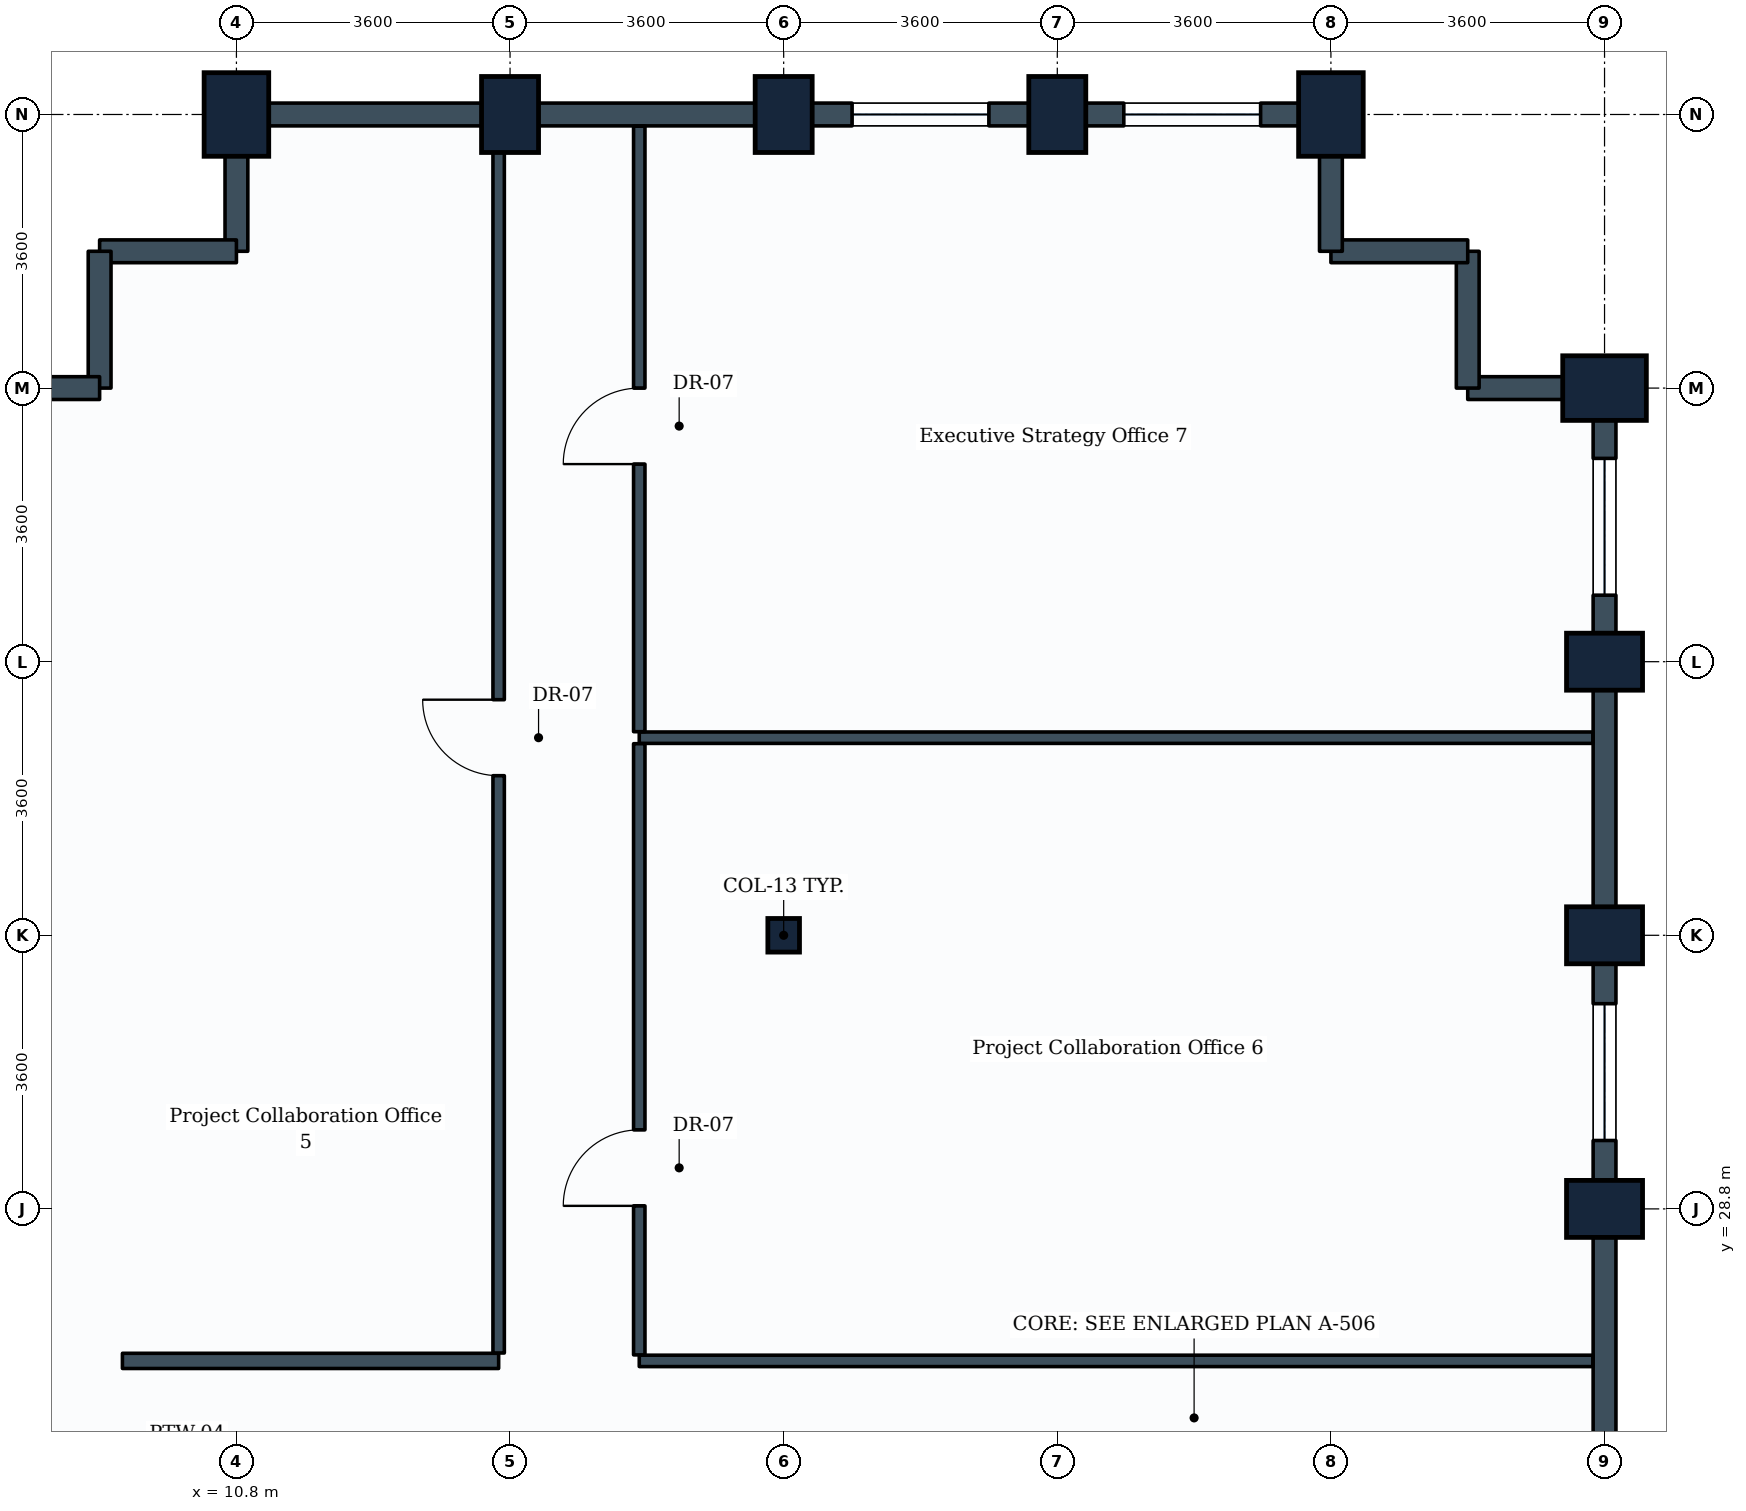
"""IFC4 building model, lengths in metres.
Left out: names, types, materials, properties, quantities, classifications, styles, units other than length and angle.
Written with IfcOpenShell. Run it as: python <this file> out.ifc"""

import sys

from ifc_helpers import new_model, si_unit, direction, frame, frame_2d, origin, origin_2d, place, context, subcontext, project, spatial, rectangle, i_section, extrude, element, fill, save


model = new_model("IFC4")
c1 = context("Model", 3, precision=1e-05, world=origin(), true_north=direction((0.0, 1.0)))
c2 = subcontext(c1, "Body", "Model", "MODEL_VIEW")
j1 = project(units=[si_unit("LENGTHUNIT", "METRE"), si_unit("PLANEANGLEUNIT", "RADIAN")], contexts=[c1])
p1 = place(None, origin())
s1 = spatial("IfcSite", under=j1, at=p1, CompositionType="ELEMENT")
p2 = place(p1, origin())
s2 = spatial("IfcBuilding", under=s1, at=p2, CompositionType="ELEMENT")
p3 = place(p2, frame((0.0, 0.0, 158.0)))
s3 = spatial("IfcBuildingStorey", under=s2, at=p3, CompositionType="ELEMENT", Elevation=158.0)
p4 = place(p3, frame((10.8, 43.2, 0.0), z_axis=(0.0, 0.0, 1.0), x_axis=(1.0, 0.0, 0.0)))
e1 = element("IfcColumn", 1, at=p4, inside=s3, PredefinedType="COLUMN", context=c2, shape_type="SweptSolid", body=[
    extrude(rectangle(XDim=0.85, YDim=1.1, at=origin_2d()), origin(), (0.0, 0.0, 1.0), 3.8),
])
p5 = place(p3, frame((14.4, 43.2, 0.0), z_axis=(0.0, 0.0, 1.0), x_axis=(1.0, 0.0, 0.0)))
e2 = element("IfcColumn", 2, at=p5, inside=s3, PredefinedType="COLUMN", context=c2, shape_type="SweptSolid", body=[
    extrude(rectangle(XDim=0.75, YDim=1.0, at=origin_2d()), origin(), (0.0, 0.0, 1.0), 3.8),
])
p6 = place(p3, frame((18.0, 32.4, 0.0), z_axis=(0.0, 0.0, 1.0), x_axis=(1.0, 0.0, 0.0)))
e3 = element("IfcColumn", 3, at=p6, inside=s3, PredefinedType="COLUMN", context=c2, shape_type="SweptSolid", body=[
    extrude(i_section(OverallWidth=0.416, OverallDepth=0.442, WebThickness=0.025, FlangeThickness=0.041, FilletRadius=0.015, at=origin_2d()), origin(), (0.0, 0.0, 1.0), 3.8),
])
for number, where, z_axis, x_axis in (
    (4, (18.0, 43.2, 0.0), (0.0, 0.0, 1.0), (1.0, 0.0, 0.0)),
    (5, (21.6, 43.2, 0.0), (0.0, 0.0, 1.0), (1.0, 0.0, 0.0)),
):
    element("IfcColumn", number, at=place(p3, frame(where, z_axis=z_axis, x_axis=x_axis)), inside=s3, PredefinedType="COLUMN", context=c2, shape_type="SweptSolid", body=[
        extrude(rectangle(XDim=0.75, YDim=1.0, at=origin_2d()), origin(), (0.0, 0.0, 1.0), 3.8),
    ])
p7 = place(p3, frame((25.2, 43.2, 0.0), z_axis=(0.0, 0.0, 1.0), x_axis=(1.0, 0.0, 0.0)))
e6 = element("IfcColumn", 6, at=p7, inside=s3, PredefinedType="COLUMN", context=c2, shape_type="SweptSolid", body=[
    extrude(rectangle(XDim=0.85, YDim=1.1, at=origin_2d()), origin(), (0.0, 0.0, 1.0), 3.8),
])
for number, where, z_axis, x_axis in (
    (7, (28.8, 28.8, 0.0), (0.0, 0.0, 1.0), (0.0, 1.0, 0.0)),
    (8, (28.8, 32.4, 0.0), (0.0, 0.0, 1.0), (0.0, 1.0, 0.0)),
    (9, (28.8, 36.0, 0.0), (0.0, 0.0, 1.0), (0.0, 1.0, 0.0)),
):
    element("IfcColumn", number, at=place(p3, frame(where, z_axis=z_axis, x_axis=x_axis)), inside=s3, PredefinedType="COLUMN", context=c2, shape_type="SweptSolid", body=[
        extrude(rectangle(XDim=0.75, YDim=1.0, at=origin_2d()), origin(), (0.0, 0.0, 1.0), 3.8),
    ])
p8 = place(p3, frame((28.8, 39.6, 0.0), z_axis=(0.0, 0.0, 1.0), x_axis=(0.0, 1.0, 0.0)))
e10 = element("IfcColumn", 10, at=p8, inside=s3, PredefinedType="COLUMN", context=c2, shape_type="SweptSolid", body=[
    extrude(rectangle(XDim=0.85, YDim=1.1, at=origin_2d()), origin(), (0.0, 0.0, 1.0), 3.8),
])
p9 = place(p3, frame((28.8, 28.8, 0.0), z_axis=(0.0, 0.0, 1.0), x_axis=(0.0, -1.0, 0.0)))
e11 = element("IfcWall", 11, at=p9, inside=s3, PredefinedType="STANDARD", context=c2, shape_type="SweptSolid", body=[
    extrude(rectangle(XDim=3.6, YDim=0.3, at=frame_2d((1.8, 0.0))), origin(), (0.0, 0.0, 1.0), 3.17),
])
p10 = place(p3, frame((28.8, 32.4, 0.0), z_axis=(0.0, 0.0, 1.0), x_axis=(0.0, -1.0, 0.0)))
e12 = element("IfcWall", 12, at=p10, inside=s3, PredefinedType="STANDARD", context=c2, shape_type="SweptSolid", body=[
    extrude(rectangle(XDim=3.6, YDim=0.3, at=frame_2d((1.8, 0.0))), origin(), (0.0, 0.0, 1.0), 2.93),
])
p11 = place(p10, frame((0.9, 0.0, 0.85)))
e13 = element("IfcOpeningElement", 13, at=p11, cuts=e12, PredefinedType="OPENING", context=c2, shape_type="SweptSolid", body=[
    extrude(rectangle(XDim=1.8, YDim=1.35, at=frame_2d((0.9, 0.675))), frame((0.0, 0.16, 0.0), z_axis=(0.0, -1.0, 0.0), x_axis=(1.0, 0.0, 0.0)), (0.0, 0.0, 1.0), 0.32),
])
p12 = place(p3, frame((28.8, 36.0, 0.0), z_axis=(0.0, 0.0, 1.0), x_axis=(0.0, -1.0, 0.0)))
e14 = element("IfcWall", 14, at=p12, inside=s3, PredefinedType="STANDARD", context=c2, shape_type="SweptSolid", body=[
    extrude(rectangle(XDim=3.6, YDim=0.3, at=frame_2d((1.8, 0.0))), origin(), (0.0, 0.0, 1.0), 2.93),
])
p13 = place(p3, frame((28.8, 39.6, 0.0), z_axis=(0.0, 0.0, 1.0), x_axis=(0.0, -1.0, 0.0)))
e15 = element("IfcWall", 15, at=p13, inside=s3, PredefinedType="STANDARD", context=c2, shape_type="SweptSolid", body=[
    extrude(rectangle(XDim=3.6, YDim=0.3, at=frame_2d((1.8, 0.0))), origin(), (0.0, 0.0, 1.0), 2.93),
])
p14 = place(p13, frame((0.925, 0.0, 0.85)))
e16 = element("IfcOpeningElement", 16, at=p14, cuts=e15, PredefinedType="OPENING", context=c2, shape_type="SweptSolid", body=[
    extrude(rectangle(XDim=1.8, YDim=1.35, at=frame_2d((0.9, 0.675))), frame((0.0, 0.16, 0.0), z_axis=(0.0, -1.0, 0.0), x_axis=(1.0, 0.0, 0.0)), (0.0, 0.0, 1.0), 0.32),
])
p15 = place(p3, frame((27.0, 39.6, 0.0), z_axis=(0.0, 0.0, 1.0), x_axis=(1.0, 0.0, 0.0)))
e17 = element("IfcWall", 17, at=p15, inside=s3, PredefinedType="STANDARD", context=c2, shape_type="SweptSolid", body=[
    extrude(rectangle(XDim=1.8, YDim=0.3, at=frame_2d((0.9, 0.0))), origin(), (0.0, 0.0, 1.0), 2.93),
])
p16 = place(p3, frame((27.0, 39.6, 0.0), z_axis=(0.0, 0.0, 1.0), x_axis=(0.0, 1.0, 0.0)))
e18 = element("IfcWall", 18, at=p16, inside=s3, PredefinedType="STANDARD", context=c2, shape_type="SweptSolid", body=[
    extrude(rectangle(XDim=1.8, YDim=0.3, at=frame_2d((0.9, 0.0))), origin(), (0.0, 0.0, 1.0), 3.535),
])
p17 = place(p3, frame((25.2, 41.4, 0.0), z_axis=(0.0, 0.0, 1.0), x_axis=(1.0, 0.0, 0.0)))
e19 = element("IfcWall", 19, at=p17, inside=s3, PredefinedType="STANDARD", context=c2, shape_type="SweptSolid", body=[
    extrude(rectangle(XDim=1.8, YDim=0.3, at=frame_2d((0.9, 0.0))), origin(), (0.0, 0.0, 1.0), 3.535),
])
p18 = place(p3, frame((25.2, 41.4, 0.0), z_axis=(0.0, 0.0, 1.0), x_axis=(0.0, 1.0, 0.0)))
e20 = element("IfcWall", 20, at=p18, inside=s3, PredefinedType="STANDARD", context=c2, shape_type="SweptSolid", body=[
    extrude(rectangle(XDim=1.8, YDim=0.3, at=frame_2d((0.9, 0.0))), origin(), (0.0, 0.0, 1.0), 2.93),
])
p19 = place(p3, frame((21.6, 43.2, 0.0), z_axis=(0.0, 0.0, 1.0), x_axis=(1.0, 0.0, 0.0)))
e21 = element("IfcWall", 21, at=p19, inside=s3, PredefinedType="STANDARD", context=c2, shape_type="SweptSolid", body=[
    extrude(rectangle(XDim=3.6, YDim=0.3, at=frame_2d((1.8, 0.0))), origin(), (0.0, 0.0, 1.0), 2.93),
])
p20 = place(p19, frame((0.875, 0.0, 0.85)))
e22 = element("IfcOpeningElement", 22, at=p20, cuts=e21, PredefinedType="OPENING", context=c2, shape_type="SweptSolid", body=[
    extrude(rectangle(XDim=1.8, YDim=1.35, at=frame_2d((0.9, 0.675))), frame((0.0, 0.16, 0.0), z_axis=(0.0, -1.0, 0.0), x_axis=(1.0, 0.0, 0.0)), (0.0, 0.0, 1.0), 0.32),
])
p21 = place(p3, frame((18.0, 43.2, 0.0), z_axis=(0.0, 0.0, 1.0), x_axis=(1.0, 0.0, 0.0)))
e23 = element("IfcWall", 23, at=p21, inside=s3, PredefinedType="STANDARD", context=c2, shape_type="SweptSolid", body=[
    extrude(rectangle(XDim=3.6, YDim=0.3, at=frame_2d((1.8, 0.0))), origin(), (0.0, 0.0, 1.0), 2.93),
])
p22 = place(p21, frame((0.9, 0.0, 0.85)))
e24 = element("IfcOpeningElement", 24, at=p22, cuts=e23, PredefinedType="OPENING", context=c2, shape_type="SweptSolid", body=[
    extrude(rectangle(XDim=1.8, YDim=1.35, at=frame_2d((0.9, 0.675))), frame((0.0, 0.16, 0.0), z_axis=(0.0, -1.0, 0.0), x_axis=(1.0, 0.0, 0.0)), (0.0, 0.0, 1.0), 0.32),
])
p23 = place(p3, frame((14.4, 43.2, 0.0), z_axis=(0.0, 0.0, 1.0), x_axis=(1.0, 0.0, 0.0)))
e25 = element("IfcWall", 25, at=p23, inside=s3, PredefinedType="STANDARD", context=c2, shape_type="SweptSolid", body=[
    extrude(rectangle(XDim=3.6, YDim=0.3, at=frame_2d((1.8, 0.0))), origin(), (0.0, 0.0, 1.0), 2.93),
])
p24 = place(p3, frame((10.8, 43.2, 0.0), z_axis=(0.0, 0.0, 1.0), x_axis=(1.0, 0.0, 0.0)))
e26 = element("IfcWall", 26, at=p24, inside=s3, PredefinedType="STANDARD", context=c2, shape_type="SweptSolid", body=[
    extrude(rectangle(XDim=3.6, YDim=0.3, at=frame_2d((1.8, 0.0))), origin(), (0.0, 0.0, 1.0), 2.93),
])
p25 = place(p3, frame((10.8, 41.4, 0.0), z_axis=(0.0, 0.0, 1.0), x_axis=(0.0, 1.0, 0.0)))
e27 = element("IfcWall", 27, at=p25, inside=s3, PredefinedType="STANDARD", context=c2, shape_type="SweptSolid", body=[
    extrude(rectangle(XDim=1.8, YDim=0.3, at=frame_2d((0.9, 0.0))), origin(), (0.0, 0.0, 1.0), 2.93),
])
p26 = place(p3, frame((9.0, 41.4, 0.0), z_axis=(0.0, 0.0, 1.0), x_axis=(1.0, 0.0, 0.0)))
e28 = element("IfcWall", 28, at=p26, inside=s3, PredefinedType="STANDARD", context=c2, shape_type="SweptSolid", body=[
    extrude(rectangle(XDim=1.8, YDim=0.3, at=frame_2d((0.9, 0.0))), origin(), (0.0, 0.0, 1.0), 3.535),
])
p27 = place(p3, frame((9.0, 39.6, 0.0), z_axis=(0.0, 0.0, 1.0), x_axis=(0.0, 1.0, 0.0)))
e29 = element("IfcWall", 29, at=p27, inside=s3, PredefinedType="STANDARD", context=c2, shape_type="SweptSolid", body=[
    extrude(rectangle(XDim=1.8, YDim=0.3, at=frame_2d((0.9, 0.0))), origin(), (0.0, 0.0, 1.0), 3.535),
])
p28 = place(p3, frame((7.2, 39.6, 0.0), z_axis=(0.0, 0.0, 1.0), x_axis=(1.0, 0.0, 0.0)))
e30 = element("IfcWall", 30, at=p28, inside=s3, PredefinedType="STANDARD", context=c2, shape_type="SweptSolid", body=[
    extrude(rectangle(XDim=1.8, YDim=0.3, at=frame_2d((0.9, 0.0))), origin(), (0.0, 0.0, 1.0), 2.93),
])
p29 = place(p3, frame((9.3, 26.8, 0.0), z_axis=(0.0, 0.0, 1.0), x_axis=(1.0, 0.0, 0.0)))
e31 = element("IfcWall", 31, at=p29, inside=s3, PredefinedType="PARTITIONING", context=c2, shape_type="SweptSolid", body=[
    extrude(rectangle(XDim=4.95, YDim=0.2, at=frame_2d((2.475, 0.0))), origin(), (0.0, 0.0, 1.0), 3.535),
])
p30 = place(p3, frame((14.25, 26.904, 0.0), z_axis=(0.0, 0.0, 1.0), x_axis=(0.0, 1.0, 0.0)))
e32 = element("IfcWall", 32, at=p30, inside=s3, PredefinedType="PARTITIONING", context=c2, shape_type="SweptSolid", body=[
    extrude(rectangle(XDim=16.142, YDim=0.15, at=frame_2d((8.071, 0.0))), origin(), (0.0, 0.0, 1.0), 2.93),
])
p31 = place(p30, frame((7.596, 0.0, 0.0)))
e33 = element("IfcOpeningElement", 33, at=p31, cuts=e32, PredefinedType="OPENING", context=c2, shape_type="SweptSolid", body=[
    extrude(rectangle(XDim=1.0, YDim=2.1, at=frame_2d((0.5, 1.05))), frame((0.0, 0.085, 0.0), z_axis=(0.0, -1.0, 0.0), x_axis=(1.0, 0.0, 0.0)), (0.0, 0.0, 1.0), 0.17),
])
p32 = place(p3, frame((16.1, 26.8, 0.0), z_axis=(0.0, 0.0, 1.0), x_axis=(1.0, 0.0, 0.0)))
e34 = element("IfcWall", 34, at=p32, inside=s3, PredefinedType="PARTITIONING", context=c2, shape_type="SweptSolid", body=[
    extrude(rectangle(XDim=12.546, YDim=0.15, at=frame_2d((6.273, 0.0))), origin(), (0.0, 0.0, 1.0), 3.17),
])
p33 = place(p3, frame((16.1, 35.0, 0.0), z_axis=(0.0, 0.0, 1.0), x_axis=(1.0, 0.0, 0.0)))
e35 = element("IfcWall", 35, at=p33, inside=s3, PredefinedType="PARTITIONING", context=c2, shape_type="SweptSolid", body=[
    extrude(rectangle(XDim=12.546, YDim=0.15, at=frame_2d((6.273, 0.0))), origin(), (0.0, 0.0, 1.0), 2.93),
])
p34 = place(p3, frame((16.1, 26.879, 0.0), z_axis=(0.0, 0.0, 1.0), x_axis=(0.0, 1.0, 0.0)))
e36 = element("IfcWall", 36, at=p34, inside=s3, PredefinedType="PARTITIONING", context=c2, shape_type="SweptSolid", body=[
    extrude(rectangle(XDim=8.042, YDim=0.15, at=frame_2d((4.021, 0.0))), origin(), (0.0, 0.0, 1.0), 3.17),
])
p35 = place(p34, frame((1.961, 0.0, 0.0)))
e37 = element("IfcOpeningElement", 37, at=p35, cuts=e36, PredefinedType="OPENING", context=c2, shape_type="SweptSolid", body=[
    extrude(rectangle(XDim=1.0, YDim=2.1, at=frame_2d((0.5, 1.05))), frame((0.0, 0.085, 0.0), z_axis=(0.0, -1.0, 0.0), x_axis=(1.0, 0.0, 0.0)), (0.0, 0.0, 1.0), 0.17),
])
p36 = place(p3, frame((16.1, 35.079, 0.0), z_axis=(0.0, 0.0, 1.0), x_axis=(0.0, 1.0, 0.0)))
e38 = element("IfcWall", 38, at=p36, inside=s3, PredefinedType="PARTITIONING", context=c2, shape_type="SweptSolid", body=[
    extrude(rectangle(XDim=7.967, YDim=0.15, at=frame_2d((3.983, 0.0))), origin(), (0.0, 0.0, 1.0), 2.93),
])
p37 = place(p36, frame((3.521, 0.0, 0.0)))
e39 = element("IfcOpeningElement", 39, at=p37, cuts=e38, PredefinedType="OPENING", context=c2, shape_type="SweptSolid", body=[
    extrude(rectangle(XDim=1.0, YDim=2.1, at=frame_2d((0.5, 1.05))), frame((0.0, 0.085, 0.0), z_axis=(0.0, -1.0, 0.0), x_axis=(1.0, 0.0, 0.0)), (0.0, 0.0, 1.0), 0.17),
])
p38 = place(p11, origin())
e40 = element("IfcWindow", 40, at=p38, inside=s3, PartitioningType="SINGLE_PANEL", PredefinedType="WINDOW", context=c2, shape_type="SweptSolid", body=[
    extrude(rectangle(XDim=1.8, YDim=1.35, at=frame_2d((0.9, 0.675))), frame((0.0, 0.03, 0.0), z_axis=(0.0, -1.0, 0.0), x_axis=(1.0, 0.0, 0.0)), (0.0, 0.0, 1.0), 0.06),
])
fill(e13, e40)
p39 = place(p14, origin())
e41 = element("IfcWindow", 41, at=p39, inside=s3, PartitioningType="SINGLE_PANEL", PredefinedType="WINDOW", context=c2, shape_type="SweptSolid", body=[
    extrude(rectangle(XDim=1.8, YDim=1.35, at=frame_2d((0.9, 0.675))), frame((0.0, 0.03, 0.0), z_axis=(0.0, -1.0, 0.0), x_axis=(1.0, 0.0, 0.0)), (0.0, 0.0, 1.0), 0.06),
])
fill(e16, e41)
p40 = place(p20, origin())
e42 = element("IfcWindow", 42, at=p40, inside=s3, PartitioningType="SINGLE_PANEL", PredefinedType="WINDOW", context=c2, shape_type="SweptSolid", body=[
    extrude(rectangle(XDim=1.8, YDim=1.35, at=frame_2d((0.9, 0.675))), frame((0.0, 0.03, 0.0), z_axis=(0.0, -1.0, 0.0), x_axis=(1.0, 0.0, 0.0)), (0.0, 0.0, 1.0), 0.06),
])
fill(e22, e42)
p41 = place(p22, origin())
e43 = element("IfcWindow", 43, at=p41, inside=s3, PartitioningType="SINGLE_PANEL", PredefinedType="WINDOW", context=c2, shape_type="SweptSolid", body=[
    extrude(rectangle(XDim=1.8, YDim=1.35, at=frame_2d((0.9, 0.675))), frame((0.0, 0.03, 0.0), z_axis=(0.0, -1.0, 0.0), x_axis=(1.0, 0.0, 0.0)), (0.0, 0.0, 1.0), 0.06),
])
fill(e24, e43)
p42 = place(p31, origin())
e44 = element("IfcDoor", 44, at=p42, inside=s3, OperationType="SINGLE_SWING_RIGHT", PredefinedType="DOOR", context=c2, shape_type="SweptSolid", body=[
    extrude(rectangle(XDim=1.0, YDim=2.1, at=frame_2d((0.5, 1.05))), frame((0.0, 0.025, 0.0), z_axis=(0.0, -1.0, 0.0), x_axis=(1.0, 0.0, 0.0)), (0.0, 0.0, 1.0), 0.05),
])
fill(e33, e44)
p43 = place(p35, origin())
e45 = element("IfcDoor", 45, at=p43, inside=s3, OperationType="SINGLE_SWING_LEFT", PredefinedType="DOOR", context=c2, shape_type="SweptSolid", body=[
    extrude(rectangle(XDim=1.0, YDim=2.1, at=frame_2d((0.5, 1.05))), frame((0.0, 0.025, 0.0), z_axis=(0.0, -1.0, 0.0), x_axis=(1.0, 0.0, 0.0)), (0.0, 0.0, 1.0), 0.05),
])
fill(e37, e45)
p44 = place(p37, origin())
e46 = element("IfcDoor", 46, at=p44, inside=s3, OperationType="SINGLE_SWING_LEFT", PredefinedType="DOOR", context=c2, shape_type="SweptSolid", body=[
    extrude(rectangle(XDim=1.0, YDim=2.1, at=frame_2d((0.5, 1.05))), frame((0.0, 0.025, 0.0), z_axis=(0.0, -1.0, 0.0), x_axis=(1.0, 0.0, 0.0)), (0.0, 0.0, 1.0), 0.05),
])
fill(e39, e46)
save(model, sys.argv[1])
